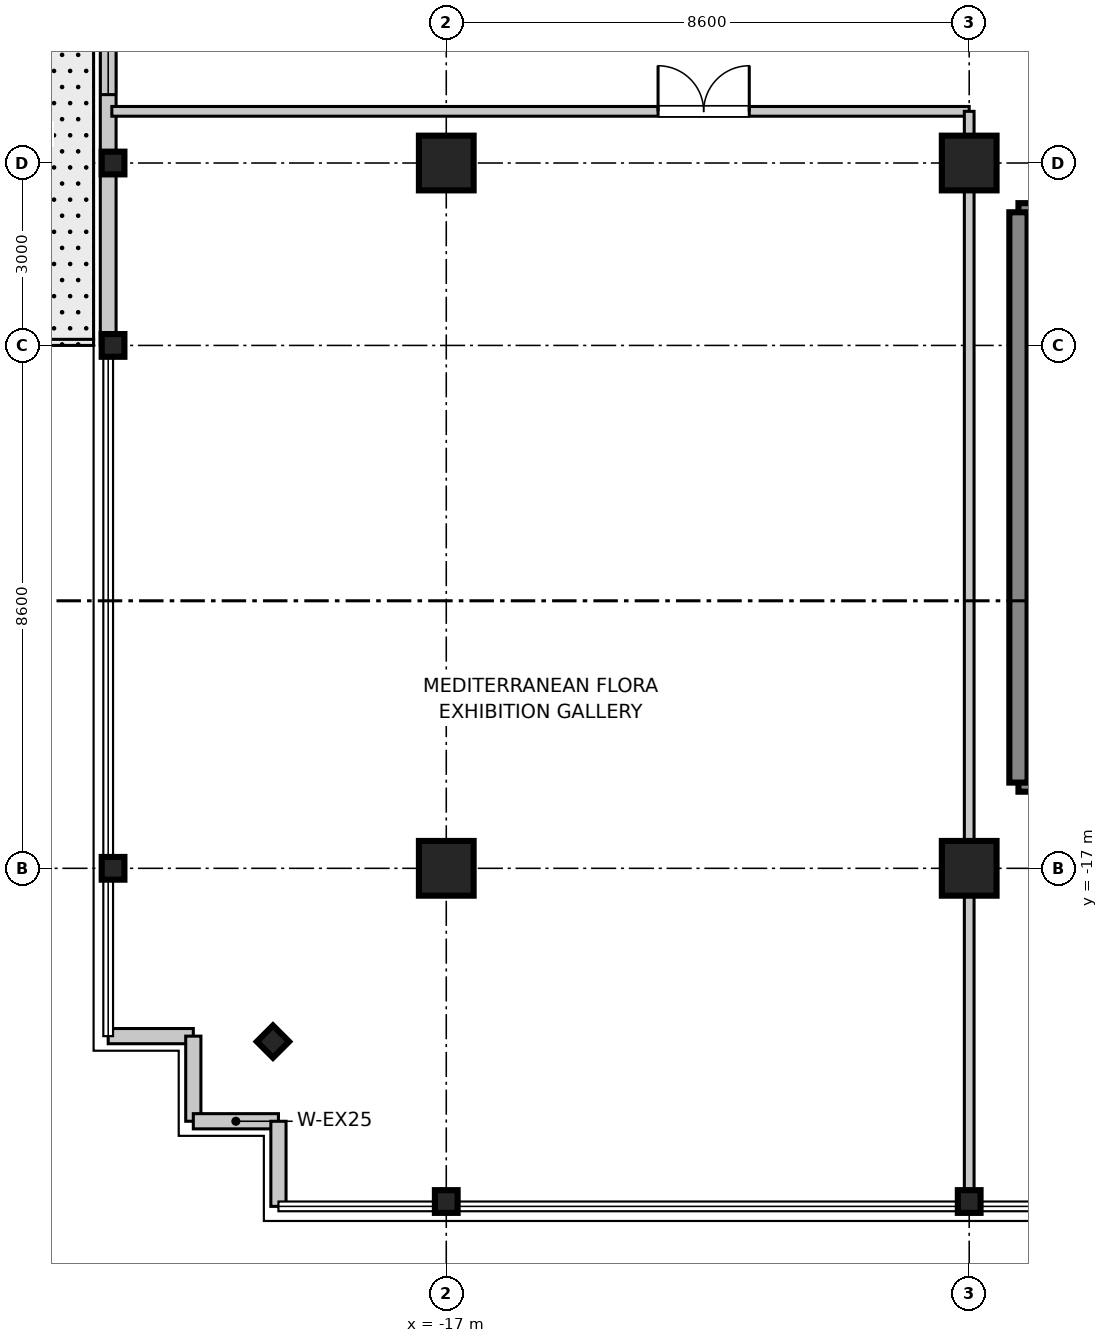
"""IFC4 building model, lengths in metres.
Left out: names, types, materials, properties, quantities, classifications, styles, units other than length and angle.
Written with IfcOpenShell. Run it as: python <this file> out.ifc"""

import sys

from ifc_helpers import new_model, si_unit, direction, frame, frame_2d, origin, origin_2d, place, context, subcontext, project, spatial, rectangle, i_section, extrude, source, transform, mapped, element, fill, save


model = new_model("IFC4")
c1 = context("Model", 3, precision=1e-05, world=origin(), true_north=direction((0.0, 1.0)))
c2 = subcontext(c1, "Body", "Model", "MODEL_VIEW")
j1 = project(units=[si_unit("LENGTHUNIT", "METRE"), si_unit("PLANEANGLEUNIT", "RADIAN")], contexts=[c1])
p1 = place(None, origin())
s1 = spatial("IfcSite", under=j1, at=p1, CompositionType="ELEMENT")
p2 = place(p1, origin())
s2 = spatial("IfcBuilding", under=s1, at=p2, CompositionType="ELEMENT")
p3 = place(p2, frame((0.0, 0.0, 352.05)))
s3 = spatial("IfcBuildingStorey", under=s2, at=p3, CompositionType="ELEMENT", Elevation=352.05)
m1 = source(origin(), c2, "Body", "SweptSolid", [
    extrude(rectangle(XDim=0.9, YDim=0.9, at=origin_2d()), origin(), (0.0, 0.0, 1.0), 4.955),
])
for number, where, z_axis, x_axis in (
    (1, (-17.0, -17.0, 0.0), (0.0, 0.0, 1.0), (1.0, 0.0, 0.0)),
    (2, (-17.0, -5.4, 0.0), (0.0, 0.0, 1.0), (1.0, 0.0, 0.0)),
    (3, (-8.4, -17.0, 0.0), (0.0, 0.0, 1.0), (1.0, 0.0, 0.0)),
    (4, (-8.4, -5.4, 0.0), (0.0, 0.0, 1.0), (1.0, 0.0, 0.0)),
):
    element("IfcColumn", number, at=place(p3, frame(where, z_axis=z_axis, x_axis=x_axis)), inside=s3, PredefinedType="COLUMN", context=c2, shape_type="MappedRepresentation", body=[
        mapped(m1, transform((0.0, 0.0, 0.0), scale=1.0)),
    ])
m2 = source(origin(), c2, "Body", "SweptSolid", [
    extrude(i_section(OverallWidth=0.374, OverallDepth=0.374, WebThickness=0.014, FlangeThickness=0.023, at=origin_2d()), origin(), (0.0, 0.0, 1.0), 4.955),
])
for number, where, z_axis, x_axis in (
    (5, (-22.48, -17.0, 0.0), (0.0, 0.0, 1.0), (1.0, 0.0, 0.0)),
    (6, (-22.48, -8.4, 0.0), (0.0, 0.0, 1.0), (1.0, 0.0, 0.0)),
    (7, (-22.48, -5.4, 0.0), (0.0, 0.0, 1.0), (1.0, 0.0, 0.0)),
    (8, (-17.0, -22.48, 0.0), (0.0, 0.0, 1.0), (0.0, 1.0, 0.0)),
    (9, (-8.4, -22.48, 0.0), (0.0, 0.0, 1.0), (0.0, 1.0, 0.0)),
    (10, (-19.85, -19.85, 0.0), (0.0, 0.0, 1.0), (0.707, 0.707, 0.0)),
):
    element("IfcColumn", number, at=place(p3, frame(where, z_axis=z_axis, x_axis=x_axis)), inside=s3, PredefinedType="COLUMN", context=c2, shape_type="MappedRepresentation", body=[
        mapped(m2, transform((0.0, 0.0, 0.0), scale=1.0)),
    ])
m3 = source(origin(), c2, "Body", "SweptSolid", [
    extrude(rectangle(XDim=3.98, YDim=0.3, at=frame_2d((1.99, 0.0))), origin(), (0.0, 0.0, 1.0), 4.7),
])
p4 = place(p3, frame((-7.59, -15.59, 0.0), z_axis=(0.0, 0.0, 1.0), x_axis=(1.0, 0.0, 0.0)))
e11 = element("IfcWall", 11, at=p4, inside=s3, PredefinedType="SHEAR", context=c2, shape_type="MappedRepresentation", body=[
    mapped(m3, transform((0.0, 0.0, 0.0), scale=1.0)),
])
p5 = place(p3, frame((-7.59, -6.21, 0.0), z_axis=(0.0, 0.0, 1.0), x_axis=(1.0, 0.0, 0.0)))
e12 = element("IfcWall", 12, at=p5, inside=s3, PredefinedType="SHEAR", context=c2, shape_type="MappedRepresentation", body=[
    mapped(m3, transform((0.0, 0.0, 0.0), scale=1.0)),
])
p6 = place(p5, frame((1.44, 0.0, 0.0)))
e13 = element("IfcOpeningElement", 13, at=p6, cuts=e12, PredefinedType="OPENING", context=c2, shape_type="SweptSolid", body=[
    extrude(rectangle(XDim=1.1, YDim=2.15, at=frame_2d((0.55, 1.075))), frame((0.0, 0.16, 0.0), z_axis=(0.0, -1.0, 0.0), x_axis=(1.0, 0.0, 0.0)), (0.0, 0.0, 1.0), 0.32),
])
m4 = source(origin(), c2, "Body", "SweptSolid", [
    extrude(rectangle(XDim=9.38, YDim=0.3, at=frame_2d((4.69, 0.0))), origin(), (0.0, 0.0, 1.0), 4.7),
])
p7 = place(p3, frame((-7.59, -15.59, 0.0), z_axis=(0.0, 0.0, 1.0), x_axis=(0.0, 1.0, 0.0)))
e14 = element("IfcWall", 14, at=p7, inside=s3, PredefinedType="SHEAR", context=c2, shape_type="MappedRepresentation", body=[
    mapped(m4, transform((0.0, 0.0, 0.0), scale=1.0)),
])
m5 = source(origin(), c2, "Body", "SweptSolid", [
    extrude(rectangle(XDim=1.4, YDim=0.25, at=frame_2d((0.7, 0.0))), origin(), (0.0, 0.0, 1.0), 4.7),
])
p8 = place(p3, frame((-22.56, -19.76, 0.0), z_axis=(0.0, 0.0, 1.0), x_axis=(1.0, 0.0, 0.0)))
e15 = element("IfcWall", 15, at=p8, inside=s3, PredefinedType="STANDARD", context=c2, shape_type="MappedRepresentation", body=[
    mapped(m5, transform((0.0, 0.0, 0.0), scale=1.0)),
])
m6 = source(origin(), c2, "Body", "SweptSolid", [
    extrude(rectangle(XDim=1.4, YDim=0.25, at=frame_2d((0.7, 0.0))), origin(), (0.0, 0.0, 1.0), 4.7),
])
for number, where, z_axis, x_axis in (
    (16, (-21.16, -21.16, 0.0), (0.0, 0.0, 1.0), (0.0, 1.0, 0.0)),
    (17, (-21.16, -21.16, 0.0), (0.0, 0.0, 1.0), (1.0, 0.0, 0.0)),
):
    element("IfcWall", number, at=place(p3, frame(where, z_axis=z_axis, x_axis=x_axis)), inside=s3, PredefinedType="STANDARD", context=c2, shape_type="MappedRepresentation", body=[
        mapped(m6, transform((0.0, 0.0, 0.0), scale=1.0)),
    ])
p9 = place(p3, frame((-19.76, -22.56, 0.0), z_axis=(0.0, 0.0, 1.0), x_axis=(0.0, 1.0, 0.0)))
e18 = element("IfcWall", 18, at=p9, inside=s3, PredefinedType="STANDARD", context=c2, shape_type="MappedRepresentation", body=[
    mapped(m5, transform((0.0, 0.0, 0.0), scale=1.0)),
])
m7 = source(origin(), c2, "Body", "SweptSolid", [
    extrude(rectangle(XDim=16.8, YDim=0.26, at=frame_2d((8.4, 0.0))), origin(), (0.0, 0.0, 1.0), 4.18),
])
p10 = place(p3, frame((-22.56, -8.4, 0.0), z_axis=(0.0, 0.0, 1.0), x_axis=(0.0, 1.0, 0.0)))
e19 = element("IfcWall", 19, at=p10, inside=s3, PredefinedType="STANDARD", context=c2, shape_type="MappedRepresentation", body=[
    mapped(m7, transform((0.0, 0.0, 0.0), scale=1.0)),
])
p11 = place(p10, frame((8.4, 0.0, 0.0)))
e20 = element("IfcOpeningElement", 20, at=p11, cuts=e19, PredefinedType="OPENING", context=c2, shape_type="SweptSolid", body=[
    extrude(rectangle(XDim=1.8, YDim=2.25, at=frame_2d((0.9, 1.125))), frame((0.0, 0.14, 0.0), z_axis=(0.0, -1.0, 0.0), x_axis=(1.0, 0.0, 0.0)), (0.0, 0.0, 1.0), 0.28),
])
p12 = place(p10, frame((4.125, 0.0, 0.85)))
e21 = element("IfcOpeningElement", 21, at=p12, cuts=e19, PredefinedType="OPENING", context=c2, shape_type="SweptSolid", body=[
    extrude(rectangle(XDim=1.6, YDim=1.8, at=frame_2d((0.8, 0.9))), frame((0.0, 0.14, 0.0), z_axis=(0.0, -1.0, 0.0), x_axis=(1.0, 0.0, 0.0)), (0.0, 0.0, 1.0), 0.28),
])
m8 = source(origin(), c2, "Body", "SweptSolid", [
    extrude(rectangle(XDim=14.1, YDim=0.16, at=frame_2d((7.05, 0.0))), origin(), (0.0, 0.0, 1.0), 3.4),
])
p13 = place(p3, frame((-22.5, -4.55, 0.0), z_axis=(0.0, 0.0, 1.0), x_axis=(1.0, 0.0, 0.0)))
e22 = element("IfcWall", 22, at=p13, inside=s3, PredefinedType="PARTITIONING", context=c2, shape_type="MappedRepresentation", body=[
    mapped(m8, transform((0.0, 0.0, 0.0), scale=1.0)),
])
p14 = place(p13, frame((8.983, 0.0, 0.0)))
e23 = element("IfcOpeningElement", 23, at=p14, cuts=e22, PredefinedType="OPENING", context=c2, shape_type="SweptSolid", body=[
    extrude(rectangle(XDim=1.5, YDim=2.15, at=frame_2d((0.75, 1.075))), frame((0.0, 0.09, 0.0), z_axis=(0.0, -1.0, 0.0), x_axis=(1.0, 0.0, 0.0)), (0.0, 0.0, 1.0), 0.18),
])
m9 = source(origin(), c2, "Body", "SweptSolid", [
    extrude(rectangle(XDim=17.95, YDim=0.16, at=frame_2d((8.975, 0.0))), origin(), (0.0, 0.0, 1.0), 3.4),
])
p15 = place(p3, frame((-8.4, -22.5, 0.0), z_axis=(0.0, 0.0, 1.0), x_axis=(0.0, 1.0, 0.0)))
e24 = element("IfcWall", 24, at=p15, inside=s3, PredefinedType="PARTITIONING", context=c2, shape_type="MappedRepresentation", body=[
    mapped(m9, transform((0.0, 0.0, 0.0), scale=1.0)),
])
m10 = source(origin(), c2, "Body", "SweptSolid", [
    extrude(rectangle(XDim=1.5, YDim=2.15, at=frame_2d((0.75, 1.075))), frame((0.0, 0.025, 0.0), z_axis=(0.0, -1.0, 0.0), x_axis=(1.0, 0.0, 0.0)), (0.0, 0.0, 1.0), 0.05),
])
p16 = place(p14, frame((1.5, 0.0, 0.0), z_axis=(0.0, 0.0, 1.0), x_axis=(-1.0, 0.0, 0.0)))
e25 = element("IfcDoor", 25, at=p16, inside=s3, OperationType="DOUBLE_DOOR_SINGLE_SWING", PredefinedType="DOOR", context=c2, shape_type="MappedRepresentation", body=[
    mapped(m10, transform((0.0, 0.0, 0.0), scale=1.0)),
])
fill(e23, e25)
m11 = source(origin(), c2, "Body", "SweptSolid", [
    extrude(rectangle(XDim=1.6, YDim=1.8, at=frame_2d((0.8, 0.9))), frame((0.0, 0.03, 0.0), z_axis=(0.0, -1.0, 0.0), x_axis=(1.0, 0.0, 0.0)), (0.0, 0.0, 1.0), 0.06),
])
p17 = place(p12, origin())
e26 = element("IfcWindow", 26, at=p17, inside=s3, PartitioningType="SINGLE_PANEL", PredefinedType="WINDOW", context=c2, shape_type="MappedRepresentation", body=[
    mapped(m11, transform((0.0, 0.0, 0.0), scale=1.0)),
])
fill(e21, e26)
save(model, sys.argv[1])
